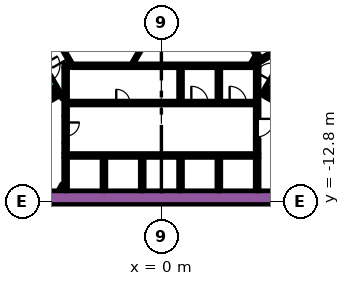
"""IFC4 building model, lengths in metres.
Left out: names, types, materials, properties, quantities, classifications, styles, units other than length and angle.
Written with IfcOpenShell. Run it as: python <this file> out.ifc"""

import sys

from ifc_helpers import new_model, si_unit, direction, frame, frame_2d, origin, place, context, subcontext, project, spatial, polyline, rectangle, outline, extrude, element, fill, save


model = new_model("IFC4")
c1 = context("Model", 3, precision=1e-05, world=origin(), true_north=direction((0.0, 1.0)))
c2 = subcontext(c1, "Body", "Model", "MODEL_VIEW")
j1 = project(units=[si_unit("LENGTHUNIT", "METRE"), si_unit("PLANEANGLEUNIT", "RADIAN")], contexts=[c1])
p1 = place(None, origin())
s1 = spatial("IfcSite", under=j1, at=p1, CompositionType="ELEMENT")
p2 = place(p1, origin())
s2 = spatial("IfcBuilding", under=s1, at=p2, CompositionType="ELEMENT")
p3 = place(p2, frame((0.0, 0.0, 6.0)))
s3 = spatial("IfcBuildingStorey", under=s2, at=p3, CompositionType="ELEMENT", Elevation=6.0)
p4 = place(p3, frame((6.776, 13.364, 0.0), z_axis=(0.0, 0.0, 1.0), x_axis=(0.500004177138, -0.8660229921, 0.0)))
e1 = element("IfcWall", 1, at=p4, inside=s3, PredefinedType="SOLIDWALL", context=c2, shape_type="SweptSolid", body=[
    extrude(rectangle(XDim=20.204, YDim=0.9, at=frame_2d((10.102, 0.0))), origin(), (0.0, 0.0, 1.0), 5.4),
])
p5 = place(p3, frame((-12.019, -12.55, 0.0), z_axis=(0.0, 0.0, 1.0), x_axis=(1.0, 0.0, 0.0)))
e2 = element("IfcWall", 2, at=p5, inside=s3, PredefinedType="SOLIDWALL", context=c2, shape_type="SweptSolid", body=[
    extrude(rectangle(XDim=21.63, YDim=0.9, at=frame_2d((10.815, 0.0))), origin(), (0.0, 0.0, 1.0), 5.4),
])
p6 = place(p3, frame((12.84, -9.261, 0.0), z_axis=(0.0, 0.0, 1.0), x_axis=(-0.866013990052, 0.500019768644, 0.0)))
e3 = element("IfcWall", 3, at=p6, inside=s3, PredefinedType="SOLIDWALL", context=c2, shape_type="SweptSolid", body=[
    extrude(rectangle(XDim=6.8, YDim=0.25, at=frame_2d((3.4, 0.0))), origin(), (0.0, 0.0, 1.0), 5.4),
])
p7 = place(p3, frame((6.78, -5.906, 0.0), z_axis=(0.0, 0.0, 1.0), x_axis=(0.500223362819, 0.865896406789, 0.0)))
e4 = element("IfcWall", 4, at=p7, inside=s3, PredefinedType="SOLIDWALL", context=c2, shape_type="SweptSolid", body=[
    extrude(rectangle(XDim=0.675, YDim=0.25, at=frame_2d((0.337, 0.0))), origin(), (0.0, 0.0, 1.0), 5.4),
])
p8 = place(p3, frame((-12.84, -9.261, 0.0), z_axis=(0.0, 0.0, 1.0), x_axis=(0.866016039709, 0.500016218704, 0.0)))
e5 = element("IfcWall", 5, at=p8, inside=s3, PredefinedType="SOLIDWALL", context=c2, shape_type="SweptSolid", body=[
    extrude(rectangle(XDim=7.05, YDim=0.25, at=frame_2d((3.525, 0.0))), origin(), (0.0, 0.0, 1.0), 5.4),
])
p9 = place(p3, frame((-6.905, -5.69, 0.0), z_axis=(0.0, 0.0, 1.0), x_axis=(-0.500402024738, 0.865793170242, 0.0)))
e6 = element("IfcWall", 6, at=p9, inside=s3, PredefinedType="SOLIDWALL", context=c2, shape_type="SweptSolid", body=[
    extrude(rectangle(XDim=0.425, YDim=0.25, at=frame_2d((0.212, 0.0))), origin(), (0.0, 0.0, 1.0), 5.4),
])
p10 = place(p3, frame((-6.425, -9.775, 0.0), z_axis=(0.0, 0.0, 1.0), x_axis=(1.0, 0.0, 0.0)))
e7 = element("IfcWall", 7, at=p10, inside=s3, PredefinedType="SOLIDWALL", context=c2, shape_type="SweptSolid", body=[
    extrude(rectangle(XDim=12.85, YDim=0.25, at=frame_2d((6.425, 0.0))), origin(), (0.0, 0.0, 1.0), 5.4),
])
p11 = place(p3, frame((-6.3, -9.9, 0.0), z_axis=(0.0, 0.0, 1.0), x_axis=(0.0, -1.0, 0.0)))
e8 = element("IfcWall", 8, at=p11, inside=s3, PredefinedType="SOLIDWALL", context=c2, shape_type="SweptSolid", body=[
    extrude(rectangle(XDim=2.2, YDim=0.25, at=frame_2d((1.1, 0.0))), origin(), (0.0, 0.0, 1.0), 5.4),
])
p12 = place(p3, frame((-6.3, -9.65, 0.0), z_axis=(0.0, 0.0, 1.0), x_axis=(0.0, 1.0, 0.0)))
e9 = element("IfcWall", 9, at=p12, inside=s3, PredefinedType="SOLIDWALL", context=c2, shape_type="SweptSolid", body=[
    extrude(rectangle(XDim=0.695, YDim=0.25, at=frame_2d((0.348, 0.0))), origin(), (0.0, 0.0, 1.0), 5.4),
])
p13 = place(p3, frame((-5.845, -3.875, 0.0), z_axis=(0.0, 0.0, 1.0), x_axis=(1.0, 0.0, 0.0)))
e10 = element("IfcWall", 10, at=p13, inside=s3, PredefinedType="SOLIDWALL", context=c2, shape_type="SweptSolid", body=[
    extrude(rectangle(XDim=12.27, YDim=0.25, at=frame_2d((6.135, 0.0))), origin(), (0.0, 0.0, 1.0), 5.4),
])
p14 = place(p3, frame((-6.425, -3.875, 0.0), z_axis=(0.0, 0.0, 1.0), x_axis=(1.0, 0.0, 0.0)))
e11 = element("IfcWall", 11, at=p14, inside=s3, PredefinedType="SOLIDWALL", context=c2, shape_type="SweptSolid", body=[
    extrude(rectangle(XDim=0.428, YDim=0.25, at=frame_2d((0.214, 0.0))), origin(), (0.0, 0.0, 1.0), 5.4),
])
p15 = place(p3, frame((6.3, -7.27, 0.0), z_axis=(0.0, 0.0, 1.0), x_axis=(0.0, 1.0, 0.0)))
e12 = element("IfcWall", 12, at=p15, inside=s3, PredefinedType="SOLIDWALL", context=c2, shape_type="SweptSolid", body=[
    extrude(rectangle(XDim=3.27, YDim=0.25, at=frame_2d((1.635, 0.0))), origin(), (0.0, 0.0, 1.0), 5.4),
])
p16 = place(p3, frame((6.3, -8.672, 0.0), z_axis=(0.0, 0.0, 1.0), x_axis=(0.0, -1.0, 0.0)))
e13 = element("IfcWall", 13, at=p16, inside=s3, PredefinedType="SOLIDWALL", context=c2, shape_type="SweptSolid", body=[
    extrude(rectangle(XDim=0.978, YDim=0.25, at=frame_2d((0.489, 0.0))), origin(), (0.0, 0.0, 1.0), 5.4),
])
for number, where, z_axis, x_axis in (
    (14, (3.78, -4.0, 0.0), (0.0, 0.0, 1.0), (0.0, -1.0, 0.0)),
    (15, (1.26, -4.0, 0.0), (0.0, 0.0, 1.0), (0.0, -1.0, 0.0)),
):
    element("IfcWall", number, at=place(p3, frame(where, z_axis=z_axis, x_axis=x_axis)), inside=s3, PredefinedType="SOLIDWALL", context=c2, shape_type="SweptSolid", body=[
        extrude(rectangle(XDim=2.2, YDim=0.25, at=frame_2d((1.1, 0.0))), origin(), (0.0, 0.0, 1.0), 5.4),
    ])
p17 = place(p3, frame((-6.3, -4.0, 0.0), z_axis=(0.0, 0.0, 1.0), x_axis=(0.0, -1.0, 0.0)))
e16 = element("IfcWall", 16, at=p17, inside=s3, PredefinedType="SOLIDWALL", context=c2, shape_type="SweptSolid", body=[
    extrude(rectangle(XDim=3.154, YDim=0.25, at=frame_2d((1.577, 0.0))), origin(), (0.0, 0.0, 1.0), 5.4),
])
for number, where, z_axis, x_axis in (
    (17, (6.3, -9.9, 0.0), (0.0, 0.0, 1.0), (0.0, -1.0, 0.0)),
    (18, (3.78, -9.9, 0.0), (0.0, 0.0, 1.0), (0.0, -1.0, 0.0)),
    (19, (1.26, -9.9, 0.0), (0.0, 0.0, 1.0), (0.0, -1.0, 0.0)),
    (20, (-1.26, -9.9, 0.0), (0.0, 0.0, 1.0), (0.0, -1.0, 0.0)),
    (21, (-3.78, -9.9, 0.0), (0.0, 0.0, 1.0), (0.0, -1.0, 0.0)),
):
    element("IfcWall", number, at=place(p3, frame(where, z_axis=z_axis, x_axis=x_axis)), inside=s3, PredefinedType="SOLIDWALL", context=c2, shape_type="SweptSolid", body=[
        extrude(rectangle(XDim=2.2, YDim=0.25, at=frame_2d((1.1, 0.0))), origin(), (0.0, 0.0, 1.0), 5.4),
    ])
p18 = place(p3, origin())
e22 = element("IfcWall", 22, at=p18, inside=s3, PredefinedType="SOLIDWALL", context=c2, shape_type="SweptSolid", body=[
    extrude(outline(polyline([(6.552, -3.348), (6.677, -3.564), (6.46, -3.689), (4.897, -0.981), (0.332, 6.925), (0.335, 6.925), (0.335, 6.925), (0.335, 6.925), (0.335, 7.075), (0.335, 7.075), (0.335, 7.075), (0.245, 7.075), (0.079, 7.363), (0.035, 7.439), (0.252, 7.564), (0.377, 7.348), (6.552, -3.348)])), origin(), (0.0, 0.0, 1.0), 5.4),
])
p19 = place(p3, frame((6.614, -3.456, 0.0), z_axis=(0.0, 0.0, 1.0), x_axis=(0.86602447079, 0.500001615989, 0.0)))
e23 = element("IfcWall", 23, at=p19, inside=s3, PredefinedType="SOLIDWALL", context=c2, shape_type="SweptSolid", body=[
    extrude(rectangle(XDim=3.154, YDim=0.25, at=frame_2d((1.577, 0.0))), origin(), (0.0, 0.0, 1.0), 5.4),
])
p20 = place(p3, frame((-6.708, -12.068, 0.0), z_axis=(0.0, 0.0, 1.0), x_axis=(0.500000789788, 0.8660249478, 0.0)))
e24 = element("IfcWall", 24, at=p20, inside=s3, PredefinedType="PARTITIONING", context=c2, shape_type="SweptSolid", body=[
    extrude(rectangle(XDim=0.456, YDim=0.15, at=frame_2d((0.228, 0.0))), origin(), (0.0, 0.0, 1.0), 4.5),
])
p21 = place(p3, frame((-6.534, -12.068, 0.0), z_axis=(0.0, 0.0, 1.0), x_axis=(0.500240224089, 0.865886665912, 0.0)))
e25 = element("IfcWall", 25, at=p21, inside=s3, PredefinedType="PARTITIONING", context=c2, shape_type="SweptSolid", body=[
    extrude(rectangle(XDim=0.109, YDim=0.15, at=frame_2d((0.054, 0.0))), origin(), (0.0, 0.0, 1.0), 4.5),
])
p22 = place(p3, frame((-6.48, -6.027, 0.0), z_axis=(0.0, 0.0, 1.0), x_axis=(-0.499927229454, 0.866067413802, 0.0)))
e26 = element("IfcWall", 26, at=p22, inside=s3, PredefinedType="PARTITIONING", context=c2, shape_type="SweptSolid", body=[
    extrude(rectangle(XDim=0.929, YDim=0.15, at=frame_2d((0.464, 0.0))), origin(), (0.0, 0.0, 1.0), 5.4),
])
p23 = place(p3, frame((6.945, -5.222, 0.0), z_axis=(0.0, 0.0, 1.0), x_axis=(-0.499818422106, -0.866130212453, 0.0)))
e27 = element("IfcWall", 27, at=p23, inside=s3, PredefinedType="PARTITIONING", context=c2, shape_type="SweptSolid", body=[
    extrude(rectangle(XDim=0.514, YDim=0.15, at=frame_2d((0.257, 0.0))), origin(), (0.0, 0.0, 1.0), 4.5),
])
p24 = place(p3, frame((5.936, -3.718, 0.0), z_axis=(0.0, 0.0, 1.0), x_axis=(0.499890179513, 0.866088799389, 0.0)))
e28 = element("IfcWall", 28, at=p24, inside=s3, PredefinedType="PARTITIONING", context=c2, shape_type="SweptSolid", body=[
    extrude(rectangle(XDim=0.504, YDim=0.15, at=frame_2d((0.252, 0.0))), origin(), (0.0, 0.0, 1.0), 4.5),
])
p25 = place(p3, frame((-1.887, -3.718, 0.0), z_axis=(0.0, 0.0, 1.0), x_axis=(0.500033287521, 0.866006184372, 0.0)))
e29 = element("IfcWall", 29, at=p25, inside=s3, PredefinedType="PARTITIONING", context=c2, shape_type="SweptSolid", body=[
    extrude(rectangle(XDim=3.263, YDim=0.15, at=frame_2d((1.632, 0.0))), origin(), (0.0, 0.0, 1.0), 4.5),
])
p26 = place(p3, frame((-6.175, -6.325, 0.0), z_axis=(0.0, 0.0, 1.0), x_axis=(1.0, 0.0, 0.0)))
e30 = element("IfcWall", 30, at=p26, inside=s3, PredefinedType="SOLIDWALL", context=c2, shape_type="SweptSolid", body=[
    extrude(rectangle(XDim=12.35, YDim=0.25, at=frame_2d((6.175, 0.0))), origin(), (0.0, 0.0, 1.0), 5.4),
])
p27 = place(p26, frame((3.205, 0.0, 0.0)))
e31 = element("IfcOpeningElement", 31, at=p27, cuts=e30, PredefinedType="OPENING", context=c2, shape_type="SweptSolid", body=[
    extrude(rectangle(XDim=0.9, YDim=2.1, at=frame_2d((0.45, 1.05))), frame((0.0, 0.135, 0.0), z_axis=(0.0, -1.0, 0.0), x_axis=(1.0, 0.0, 0.0)), (0.0, 0.0, 1.0), 0.27),
])
p28 = place(p26, frame((8.145, 0.0, 0.0)))
e32 = element("IfcOpeningElement", 32, at=p28, cuts=e30, PredefinedType="OPENING", context=c2, shape_type="SweptSolid", body=[
    extrude(rectangle(XDim=1.1, YDim=2.1, at=frame_2d((0.55, 1.05))), frame((0.0, 0.135, 0.0), z_axis=(0.0, -1.0, 0.0), x_axis=(1.0, 0.0, 0.0)), (0.0, 0.0, 1.0), 0.27),
])
p29 = place(p26, frame((10.665, 0.0, 0.0)))
e33 = element("IfcOpeningElement", 33, at=p29, cuts=e30, PredefinedType="OPENING", context=c2, shape_type="SweptSolid", body=[
    extrude(rectangle(XDim=1.1, YDim=2.1, at=frame_2d((0.55, 1.05))), frame((0.0, 0.135, 0.0), z_axis=(0.0, -1.0, 0.0), x_axis=(1.0, 0.0, 0.0)), (0.0, 0.0, 1.0), 0.27),
])
p30 = place(p3, frame((7.053, -5.284, 0.0), z_axis=(0.0, 0.0, 1.0), x_axis=(0.500078061341, 0.865980330357, 0.0)))
e34 = element("IfcWall", 34, at=p30, inside=s3, PredefinedType="SOLIDWALL", context=c2, shape_type="SweptSolid", body=[
    extrude(rectangle(XDim=2.1, YDim=0.4, at=frame_2d((1.05, 0.0))), origin(), (0.0, 0.0, 1.0), 5.4),
])
p31 = place(p30, frame((0.45, 0.0, 0.0)))
e35 = element("IfcOpeningElement", 35, at=p31, cuts=e34, PredefinedType="OPENING", context=c2, shape_type="SweptSolid", body=[
    extrude(rectangle(XDim=1.2, YDim=2.1, at=frame_2d((0.6, 1.05))), frame((0.0, 0.21, 0.0), z_axis=(0.0, -1.0, 0.0), x_axis=(1.0, 0.0, 0.0)), (0.0, 0.0, 1.0), 0.42),
])
p32 = place(p3, frame((-8.103, -3.466, 0.0), z_axis=(0.0, 0.0, 1.0), x_axis=(0.500078061341, -0.865980330357, 0.0)))
e36 = element("IfcWall", 36, at=p32, inside=s3, PredefinedType="SOLIDWALL", context=c2, shape_type="SweptSolid", body=[
    extrude(rectangle(XDim=2.1, YDim=0.4, at=frame_2d((1.05, 0.0))), origin(), (0.0, 0.0, 1.0), 5.4),
])
p33 = place(p32, frame((0.45, 0.0, 0.0)))
e37 = element("IfcOpeningElement", 37, at=p33, cuts=e36, PredefinedType="OPENING", context=c2, shape_type="SweptSolid", body=[
    extrude(rectangle(XDim=1.2, YDim=2.1, at=frame_2d((0.6, 1.05))), frame((0.0, 0.21, 0.0), z_axis=(0.0, -1.0, 0.0), x_axis=(1.0, 0.0, 0.0)), (0.0, 0.0, 1.0), 0.42),
])
p34 = place(p3, frame((-6.3, -7.154, 0.0), z_axis=(0.0, 0.0, 1.0), x_axis=(0.0, -1.0, 0.0)))
e38 = element("IfcWall", 38, at=p34, inside=s3, PredefinedType="SOLIDWALL", context=c2, shape_type="SweptSolid", body=[
    extrude(rectangle(XDim=1.8, YDim=0.25, at=frame_2d((0.9, 0.0))), origin(), (0.0, 0.0, 1.0), 5.4),
])
p35 = place(p34, frame((0.45, 0.0, 0.0)))
e39 = element("IfcOpeningElement", 39, at=p35, cuts=e38, PredefinedType="OPENING", context=c2, shape_type="SweptSolid", body=[
    extrude(rectangle(XDim=0.9, YDim=2.1, at=frame_2d((0.45, 1.05))), frame((0.0, 0.135, 0.0), z_axis=(0.0, -1.0, 0.0), x_axis=(1.0, 0.0, 0.0)), (0.0, 0.0, 1.0), 0.27),
])
p36 = place(p3, frame((-5.895, -3.79, 0.0), z_axis=(0.0, 0.0, 1.0), x_axis=(-0.49994051562, 0.866059744384, 0.0)))
e40 = element("IfcWall", 40, at=p36, inside=s3, PredefinedType="PARTITIONING", context=c2, shape_type="SweptSolid", body=[
    extrude(rectangle(XDim=2.1, YDim=0.15, at=frame_2d((1.05, 0.0))), origin(), (0.0, 0.0, 1.0), 4.5),
])
p37 = place(p36, frame((0.45, 0.0, 0.0)))
e41 = element("IfcOpeningElement", 41, at=p37, cuts=e40, PredefinedType="OPENING", context=c2, shape_type="SweptSolid", body=[
    extrude(rectangle(XDim=1.2, YDim=2.1, at=frame_2d((0.6, 1.05))), frame((0.0, 0.085, 0.0), z_axis=(0.0, -1.0, 0.0), x_axis=(1.0, 0.0, 0.0)), (0.0, 0.0, 1.0), 0.17),
])
p38 = place(p3, frame((6.22, -7.266, 0.0), z_axis=(0.0, 0.0, 1.0), x_axis=(0.0, -1.0, 0.0)))
e42 = element("IfcWall", 42, at=p38, inside=s3, PredefinedType="PARTITIONING", context=c2, shape_type="SweptSolid", body=[
    extrude(rectangle(XDim=1.4, YDim=0.09, at=frame_2d((0.7, 0.0))), origin(), (0.0, 0.0, 1.0), 4.5),
])
p39 = place(p38, frame((0.1, 0.0, 0.0)))
e43 = element("IfcOpeningElement", 43, at=p39, cuts=e42, PredefinedType="OPENING", context=c2, shape_type="SweptSolid", body=[
    extrude(rectangle(XDim=1.2, YDim=2.1, at=frame_2d((0.6, 1.05))), frame((0.0, 0.055, 0.0), z_axis=(0.0, -1.0, 0.0), x_axis=(1.0, 0.0, 0.0)), (0.0, 0.0, 1.0), 0.11),
])
p40 = place(p27, origin())
e44 = element("IfcDoor", 44, at=p40, inside=s3, OperationType="SINGLE_SWING_LEFT", PredefinedType="DOOR", context=c2, shape_type="SweptSolid", body=[
    extrude(rectangle(XDim=0.9, YDim=2.1, at=frame_2d((0.45, 1.05))), frame((0.0, 0.025, 0.0), z_axis=(0.0, -1.0, 0.0), x_axis=(1.0, 0.0, 0.0)), (0.0, 0.0, 1.0), 0.05),
])
fill(e31, e44)
p41 = place(p28, origin())
e45 = element("IfcDoor", 45, at=p41, inside=s3, OperationType="DOUBLE_DOOR_SLIDING", PredefinedType="DOOR", context=c2, shape_type="SweptSolid", body=[
    extrude(rectangle(XDim=1.1, YDim=2.1, at=frame_2d((0.55, 1.05))), frame((0.0, 0.025, 0.0), z_axis=(0.0, -1.0, 0.0), x_axis=(1.0, 0.0, 0.0)), (0.0, 0.0, 1.0), 0.05),
])
fill(e32, e45)
p42 = place(p29, origin())
e46 = element("IfcDoor", 46, at=p42, inside=s3, OperationType="DOUBLE_DOOR_SLIDING", PredefinedType="DOOR", context=c2, shape_type="SweptSolid", body=[
    extrude(rectangle(XDim=1.1, YDim=2.1, at=frame_2d((0.55, 1.05))), frame((0.0, 0.025, 0.0), z_axis=(0.0, -1.0, 0.0), x_axis=(1.0, 0.0, 0.0)), (0.0, 0.0, 1.0), 0.05),
])
fill(e33, e46)
p43 = place(p35, origin())
e47 = element("IfcDoor", 47, at=p43, inside=s3, OperationType="SINGLE_SWING_LEFT", PredefinedType="DOOR", context=c2, shape_type="SweptSolid", body=[
    extrude(rectangle(XDim=0.9, YDim=2.1, at=frame_2d((0.45, 1.05))), frame((0.0, 0.025, 0.0), z_axis=(0.0, -1.0, 0.0), x_axis=(1.0, 0.0, 0.0)), (0.0, 0.0, 1.0), 0.05),
])
fill(e39, e47)
p44 = place(p37, origin())
e48 = element("IfcDoor", 48, at=p44, inside=s3, OperationType="SINGLE_SWING_LEFT", PredefinedType="DOOR", context=c2, shape_type="SweptSolid", body=[
    extrude(rectangle(XDim=1.2, YDim=2.1, at=frame_2d((0.6, 1.05))), frame((0.0, 0.025, 0.0), z_axis=(0.0, -1.0, 0.0), x_axis=(1.0, 0.0, 0.0)), (0.0, 0.0, 1.0), 0.05),
])
fill(e41, e48)
p45 = place(p39, origin())
e49 = element("IfcDoor", 49, at=p45, inside=s3, OperationType="SINGLE_SWING_LEFT", PredefinedType="DOOR", context=c2, shape_type="SweptSolid", body=[
    extrude(rectangle(XDim=1.2, YDim=2.1, at=frame_2d((0.6, 1.05))), frame((0.0, 0.025, 0.0), z_axis=(0.0, -1.0, 0.0), x_axis=(1.0, 0.0, 0.0)), (0.0, 0.0, 1.0), 0.05),
])
fill(e43, e49)
save(model, sys.argv[1])
